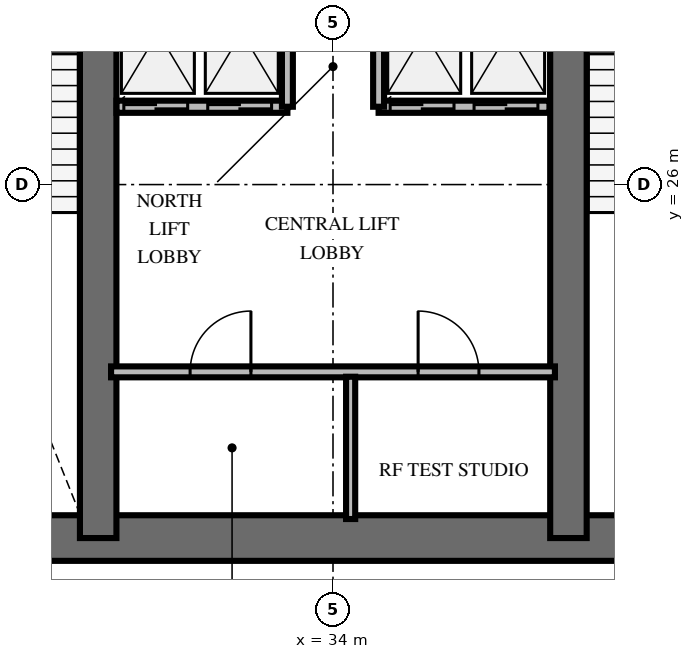
"""IFC4 building model, lengths in metres.
Left out: names, types, materials, properties, quantities, classifications, styles, units other than length and angle.
Written with IfcOpenShell. Run it as: python <this file> out.ifc"""

import sys

from ifc_helpers import new_model, si_unit, direction, frame, frame_2d, origin, place, context, subcontext, project, spatial, rectangle, extrude, element, fill, save


model = new_model("IFC4")
c1 = context("Model", 3, precision=1e-05, world=origin(), true_north=direction((0.0, 1.0)))
c2 = subcontext(c1, "Body", "Model", "MODEL_VIEW")
j1 = project(units=[si_unit("LENGTHUNIT", "METRE"), si_unit("PLANEANGLEUNIT", "RADIAN")], contexts=[c1])
p1 = place(None, origin())
s1 = spatial("IfcSite", under=j1, at=p1, CompositionType="ELEMENT")
p2 = place(p1, origin())
s2 = spatial("IfcBuilding", under=s1, at=p2, CompositionType="ELEMENT")
p3 = place(p2, frame((0.0, 0.0, 216.8)))
s3 = spatial("IfcBuildingStorey", under=s2, at=p3, CompositionType="ELEMENT", Elevation=216.8)
p4 = place(p3, frame((26.072, 20.187, 0.0), z_axis=(0.0, 0.0, 1.0), x_axis=(1.0, 0.0, 0.0)))
e1 = element("IfcWall", 1, at=p4, inside=s3, PredefinedType="SHEAR", context=c2, shape_type="SweptSolid", body=[
    extrude(rectangle(XDim=15.866, YDim=0.75, at=frame_2d((7.933, 0.0))), origin(), (0.0, 0.0, 1.0), 3.6),
])
for number, where, z_axis, x_axis in (
    (2, (30.138, 20.187, 0.0), (0.0, 0.0, 1.0), (0.0, 1.0, 0.0)),
    (3, (37.872, 20.187, 0.0), (0.0, 0.0, 1.0), (0.0, 1.0, 0.0)),
):
    element("IfcWall", number, at=place(p3, frame(where, z_axis=z_axis, x_axis=x_axis)), inside=s3, PredefinedType="SHEAR", context=c2, shape_type="SweptSolid", body=[
        extrude(rectangle(XDim=9.826, YDim=0.6, at=frame_2d((4.913, 0.0))), origin(), (0.0, 0.0, 1.0), 3.6),
    ])
p5 = place(p3, frame((30.35, 22.92, 0.0), z_axis=(0.0, 0.0, 1.0), x_axis=(1.0, 0.0, 0.0)))
e4 = element("IfcWall", 4, at=p5, inside=s3, PredefinedType="PARTITIONING", context=c2, shape_type="SweptSolid", body=[
    extrude(rectangle(XDim=7.3, YDim=0.18, at=frame_2d((3.65, 0.0))), origin(), (0.0, 0.0, 1.0), 2.45),
])
p6 = place(p5, frame((1.3, 0.0, 0.0)))
e5 = element("IfcOpeningElement", 5, at=p6, cuts=e4, PredefinedType="OPENING", context=c2, shape_type="SweptSolid", body=[
    extrude(rectangle(XDim=1.0, YDim=2.15, at=frame_2d((0.5, 1.075))), frame((0.0, 0.1, 0.0), z_axis=(0.0, -1.0, 0.0), x_axis=(1.0, 0.0, 0.0)), (0.0, 0.0, 1.0), 0.2),
])
p7 = place(p5, frame((5.05, 0.0, 0.0)))
e6 = element("IfcOpeningElement", 6, at=p7, cuts=e4, PredefinedType="OPENING", context=c2, shape_type="SweptSolid", body=[
    extrude(rectangle(XDim=1.0, YDim=2.15, at=frame_2d((0.5, 1.075))), frame((0.0, 0.1, 0.0), z_axis=(0.0, -1.0, 0.0), x_axis=(1.0, 0.0, 0.0)), (0.0, 0.0, 1.0), 0.2),
])
p8 = place(p3, frame((34.29, 20.5, 0.0), z_axis=(0.0, 0.0, 1.0), x_axis=(0.0, 1.0, 0.0)))
e7 = element("IfcWall", 7, at=p8, inside=s3, PredefinedType="PARTITIONING", context=c2, shape_type="SweptSolid", body=[
    extrude(rectangle(XDim=2.34, YDim=0.15, at=frame_2d((1.17, 0.0))), origin(), (0.0, 0.0, 1.0), 2.45),
])
p9 = place(p3, frame((30.44, 27.28, 0.0), z_axis=(0.0, 0.0, 1.0), x_axis=(1.0, 0.0, 0.0)))
e8 = element("IfcWall", 8, at=p9, inside=s3, PredefinedType="SOLIDWALL", context=c2, shape_type="SweptSolid", body=[
    extrude(rectangle(XDim=2.81, YDim=0.2, at=frame_2d((1.405, 0.0))), origin(), (0.0, 0.0, 1.0), 2.45),
])
p10 = place(p9, frame((0.12, 0.0, 0.0)))
e9 = element("IfcOpeningElement", 9, at=p10, cuts=e8, PredefinedType="OPENING", context=c2, shape_type="SweptSolid", body=[
    extrude(rectangle(XDim=1.05, YDim=2.1, at=frame_2d((0.525, 1.05))), frame((0.0, 0.11, 0.0), z_axis=(0.0, -1.0, 0.0), x_axis=(1.0, 0.0, 0.0)), (0.0, 0.0, 1.0), 0.22),
])
p11 = place(p9, frame((1.5, 0.0, 0.0)))
e10 = element("IfcOpeningElement", 10, at=p11, cuts=e8, PredefinedType="OPENING", context=c2, shape_type="SweptSolid", body=[
    extrude(rectangle(XDim=1.05, YDim=2.1, at=frame_2d((0.525, 1.05))), frame((0.0, 0.11, 0.0), z_axis=(0.0, -1.0, 0.0), x_axis=(1.0, 0.0, 0.0)), (0.0, 0.0, 1.0), 0.22),
])
p12 = place(p3, frame((33.25, 27.28, 0.0), z_axis=(0.0, 0.0, 1.0), x_axis=(0.0, 1.0, 0.0)))
e11 = element("IfcWall", 11, at=p12, inside=s3, PredefinedType="SOLIDWALL", context=c2, shape_type="SweptSolid", body=[
    extrude(rectangle(XDim=2.47, YDim=0.18, at=frame_2d((1.235, 0.0))), origin(), (0.0, 0.0, 1.0), 2.45),
])
p13 = place(p3, frame((34.75, 27.28, 0.0), z_axis=(0.0, 0.0, 1.0), x_axis=(1.0, 0.0, 0.0)))
e12 = element("IfcWall", 12, at=p13, inside=s3, PredefinedType="SOLIDWALL", context=c2, shape_type="SweptSolid", body=[
    extrude(rectangle(XDim=2.81, YDim=0.2, at=frame_2d((1.405, 0.0))), origin(), (0.0, 0.0, 1.0), 2.45),
])
p14 = place(p13, frame((0.19, 0.0, 0.0)))
e13 = element("IfcOpeningElement", 13, at=p14, cuts=e12, PredefinedType="OPENING", context=c2, shape_type="SweptSolid", body=[
    extrude(rectangle(XDim=1.05, YDim=2.1, at=frame_2d((0.525, 1.05))), frame((0.0, 0.11, 0.0), z_axis=(0.0, -1.0, 0.0), x_axis=(1.0, 0.0, 0.0)), (0.0, 0.0, 1.0), 0.22),
])
p15 = place(p13, frame((1.57, 0.0, 0.0)))
e14 = element("IfcOpeningElement", 14, at=p15, cuts=e12, PredefinedType="OPENING", context=c2, shape_type="SweptSolid", body=[
    extrude(rectangle(XDim=1.05, YDim=2.1, at=frame_2d((0.525, 1.05))), frame((0.0, 0.11, 0.0), z_axis=(0.0, -1.0, 0.0), x_axis=(1.0, 0.0, 0.0)), (0.0, 0.0, 1.0), 0.22),
])
p16 = place(p3, frame((34.75, 27.28, 0.0), z_axis=(0.0, 0.0, 1.0), x_axis=(0.0, 1.0, 0.0)))
e15 = element("IfcWall", 15, at=p16, inside=s3, PredefinedType="SOLIDWALL", context=c2, shape_type="SweptSolid", body=[
    extrude(rectangle(XDim=2.47, YDim=0.18, at=frame_2d((1.235, 0.0))), origin(), (0.0, 0.0, 1.0), 2.45),
])
p17 = place(p6, origin())
e16 = element("IfcDoor", 16, at=p17, inside=s3, OperationType="SINGLE_SWING_RIGHT", PredefinedType="DOOR", context=c2, shape_type="SweptSolid", body=[
    extrude(rectangle(XDim=1.0, YDim=2.15, at=frame_2d((0.5, 1.075))), frame((0.0, 0.025, 0.0), z_axis=(0.0, -1.0, 0.0), x_axis=(1.0, 0.0, 0.0)), (0.0, 0.0, 1.0), 0.05),
])
fill(e5, e16)
p18 = place(p7, origin())
e17 = element("IfcDoor", 17, at=p18, inside=s3, OperationType="SINGLE_SWING_LEFT", PredefinedType="DOOR", context=c2, shape_type="SweptSolid", body=[
    extrude(rectangle(XDim=1.0, YDim=2.15, at=frame_2d((0.5, 1.075))), frame((0.0, 0.025, 0.0), z_axis=(0.0, -1.0, 0.0), x_axis=(1.0, 0.0, 0.0)), (0.0, 0.0, 1.0), 0.05),
])
fill(e6, e17)
p19 = place(p10, origin())
e18 = element("IfcDoor", 18, at=p19, inside=s3, OperationType="DOUBLE_DOOR_SLIDING", PredefinedType="USERDEFINED", context=c2, shape_type="SweptSolid", body=[
    extrude(rectangle(XDim=1.05, YDim=2.1, at=frame_2d((0.525, 1.05))), frame((0.0, 0.025, 0.0), z_axis=(0.0, -1.0, 0.0), x_axis=(1.0, 0.0, 0.0)), (0.0, 0.0, 1.0), 0.05),
])
fill(e9, e18)
p20 = place(p11, origin())
e19 = element("IfcDoor", 19, at=p20, inside=s3, OperationType="DOUBLE_DOOR_SLIDING", PredefinedType="USERDEFINED", context=c2, shape_type="SweptSolid", body=[
    extrude(rectangle(XDim=1.05, YDim=2.1, at=frame_2d((0.525, 1.05))), frame((0.0, 0.025, 0.0), z_axis=(0.0, -1.0, 0.0), x_axis=(1.0, 0.0, 0.0)), (0.0, 0.0, 1.0), 0.05),
])
fill(e10, e19)
p21 = place(p14, origin())
e20 = element("IfcDoor", 20, at=p21, inside=s3, OperationType="DOUBLE_DOOR_SLIDING", PredefinedType="USERDEFINED", context=c2, shape_type="SweptSolid", body=[
    extrude(rectangle(XDim=1.05, YDim=2.1, at=frame_2d((0.525, 1.05))), frame((0.0, 0.025, 0.0), z_axis=(0.0, -1.0, 0.0), x_axis=(1.0, 0.0, 0.0)), (0.0, 0.0, 1.0), 0.05),
])
fill(e13, e20)
p22 = place(p15, origin())
e21 = element("IfcDoor", 21, at=p22, inside=s3, OperationType="DOUBLE_DOOR_SLIDING", PredefinedType="USERDEFINED", context=c2, shape_type="SweptSolid", body=[
    extrude(rectangle(XDim=1.05, YDim=2.1, at=frame_2d((0.525, 1.05))), frame((0.0, 0.025, 0.0), z_axis=(0.0, -1.0, 0.0), x_axis=(1.0, 0.0, 0.0)), (0.0, 0.0, 1.0), 0.05),
])
fill(e14, e21)
save(model, sys.argv[1])
